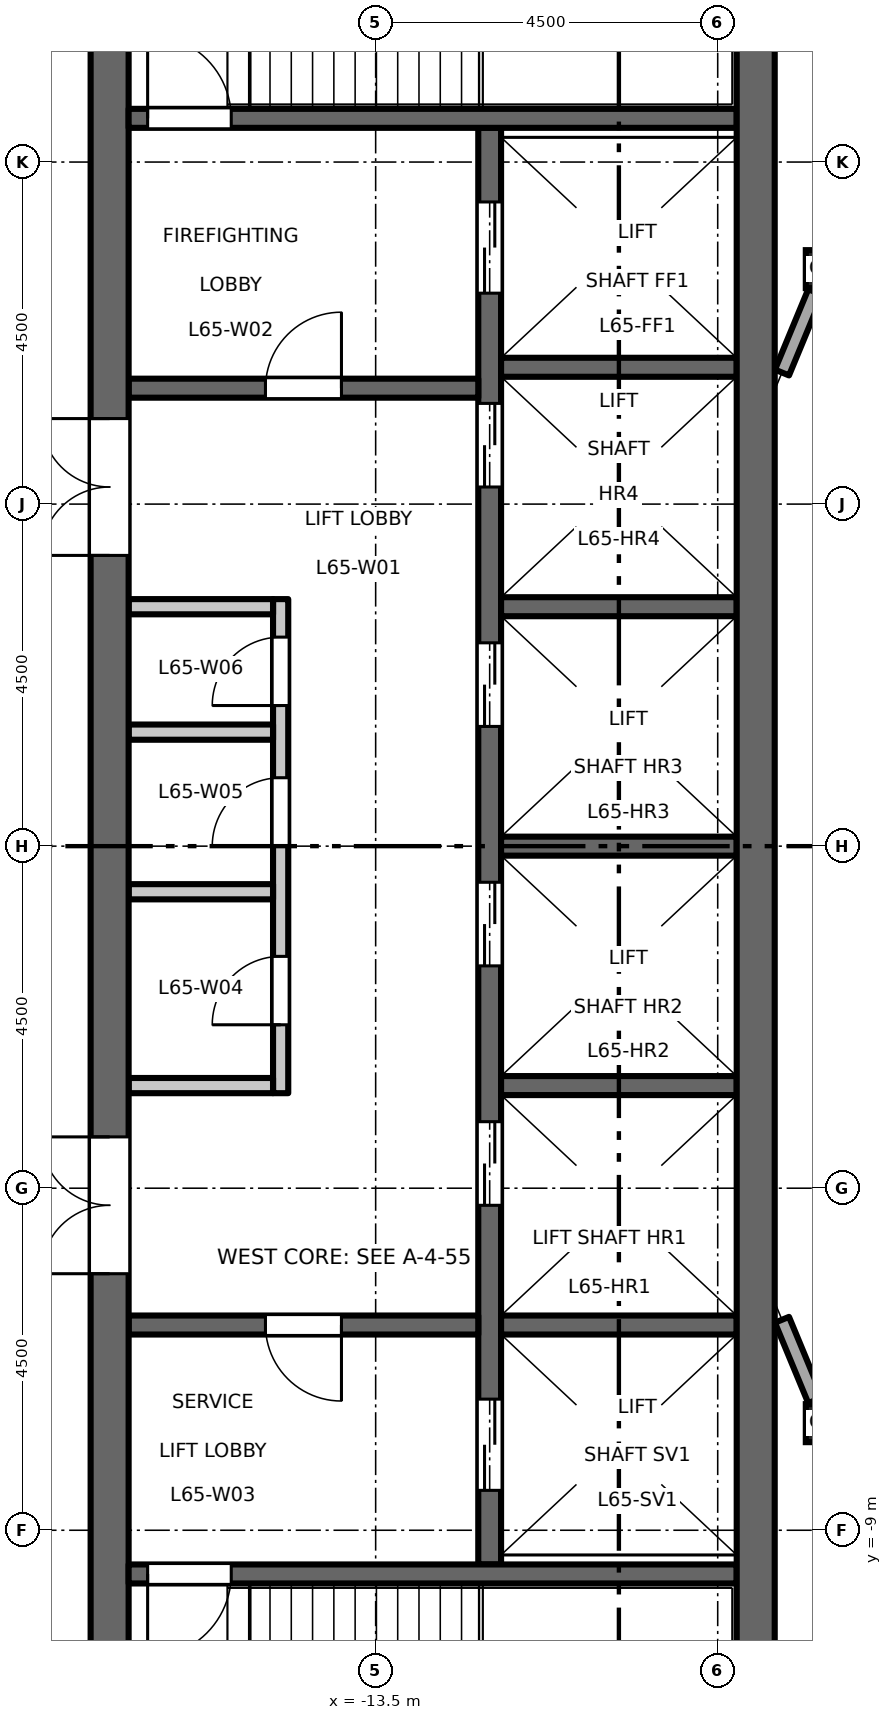
"""IFC4 building model, lengths in metres.
Left out: names, types, materials, properties, quantities, classifications, styles, units other than length and angle.
Written with IfcOpenShell. Run it as: python <this file> out.ifc"""

import sys

from ifc_helpers import new_model, si_unit, direction, frame, frame_2d, origin, origin_2d, place, context, subcontext, project, spatial, rectangle, hollow_rectangle, extrude, element, fill, save


model = new_model("IFC4")
c1 = context("Model", 3, precision=1e-05, world=origin(), true_north=direction((0.0, 1.0)))
c2 = subcontext(c1, "Body", "Model", "MODEL_VIEW")
j1 = project(units=[si_unit("LENGTHUNIT", "METRE"), si_unit("PLANEANGLEUNIT", "RADIAN")], contexts=[c1])
p1 = place(None, origin())
s1 = spatial("IfcSite", under=j1, at=p1, CompositionType="ELEMENT")
p2 = place(p1, origin())
s2 = spatial("IfcBuilding", under=s1, at=p2, CompositionType="ELEMENT")
p3 = place(p2, frame((0.0, 0.0, 303.2)))
s3 = spatial("IfcBuildingStorey", under=s2, at=p3, CompositionType="ELEMENT", Elevation=303.2)
for number, where, z_axis, x_axis in (
    (1, (-7.591, -7.591, 0.0), (0.0, 0.0, 1.0), (1.0, 0.0, 0.0)),
    (2, (-7.591, 7.591, 0.0), (0.0, 0.0, 1.0), (1.0, 0.0, 0.0)),
):
    element("IfcColumn", number, at=place(p3, frame(where, z_axis=z_axis, x_axis=x_axis)), inside=s3, PredefinedType="COLUMN", context=c2, shape_type="SweptSolid", body=[
        extrude(hollow_rectangle(XDim=0.5, YDim=0.5, WallThickness=0.025, at=origin_2d()), origin(), (0.0, 0.0, 1.0), 4.5),
    ])
p4 = place(p3, frame((-14.75, -3.25, 0.0), z_axis=(0.0, 0.0, 1.0), x_axis=(0.0, 1.0, 0.0)))
e3 = element("IfcWall", 3, at=p4, inside=s3, PredefinedType="PARTITIONING", context=c2, shape_type="SweptSolid", body=[
    extrude(rectangle(XDim=6.5, YDim=0.2, at=frame_2d((3.25, 0.0))), origin(), (0.0, 0.0, 1.0), 4.35),
])
p5 = place(p4, frame((0.9, 0.0, 0.0)))
e4 = element("IfcOpeningElement", 4, at=p5, cuts=e3, PredefinedType="OPENING", context=c2, shape_type="SweptSolid", body=[
    extrude(rectangle(XDim=0.9, YDim=2.1, at=frame_2d((0.45, 1.05))), frame((0.0, 0.11, 0.0), z_axis=(0.0, -1.0, 0.0), x_axis=(1.0, 0.0, 0.0)), (0.0, 0.0, 1.0), 0.22),
])
p6 = place(p4, frame((3.25, 0.0, 0.0)))
e5 = element("IfcOpeningElement", 5, at=p6, cuts=e3, PredefinedType="OPENING", context=c2, shape_type="SweptSolid", body=[
    extrude(rectangle(XDim=0.9, YDim=2.1, at=frame_2d((0.45, 1.05))), frame((0.0, 0.11, 0.0), z_axis=(0.0, -1.0, 0.0), x_axis=(1.0, 0.0, 0.0)), (0.0, 0.0, 1.0), 0.22),
])
p7 = place(p4, frame((5.1, 0.0, 0.0)))
e6 = element("IfcOpeningElement", 6, at=p7, cuts=e3, PredefinedType="OPENING", context=c2, shape_type="SweptSolid", body=[
    extrude(rectangle(XDim=0.9, YDim=2.1, at=frame_2d((0.45, 1.05))), frame((0.0, 0.11, 0.0), z_axis=(0.0, -1.0, 0.0), x_axis=(1.0, 0.0, 0.0)), (0.0, 0.0, 1.0), 0.22),
])
for number, where, z_axis, x_axis in (
    (7, (-14.85, 3.15, 0.0), (0.0, 0.0, 1.0), (-1.0, 0.0, 0.0)),
    (8, (-14.85, -3.15, 0.0), (0.0, 0.0, 1.0), (-1.0, 0.0, 0.0)),
    (9, (-14.85, -0.6, 0.0), (0.0, 0.0, 1.0), (-1.0, 0.0, 0.0)),
    (10, (-14.85, 1.5, 0.0), (0.0, 0.0, 1.0), (-1.0, 0.0, 0.0)),
):
    element("IfcWall", number, at=place(p3, frame(where, z_axis=z_axis, x_axis=x_axis)), inside=s3, PredefinedType="PARTITIONING", context=c2, shape_type="SweptSolid", body=[
        extrude(rectangle(XDim=1.9, YDim=0.2, at=frame_2d((0.95, 0.0))), origin(), (0.0, 0.0, 1.0), 4.35),
    ])
p8 = place(p3, frame((-12.0, -9.45, 0.0), z_axis=(0.0, 0.0, 1.0), x_axis=(0.0, 1.0, 0.0)))
e11 = element("IfcWall", 11, at=p8, inside=s3, PredefinedType="SHEAR", context=c2, shape_type="SweptSolid", body=[
    extrude(rectangle(XDim=18.9, YDim=0.3, at=frame_2d((9.45, 0.0))), origin(), (0.0, 0.0, 1.0), 4.35),
])
p9 = place(p8, frame((4.725, 0.0, 0.0)))
e12 = element("IfcOpeningElement", 12, at=p9, cuts=e11, PredefinedType="OPENING", context=c2, shape_type="SweptSolid", body=[
    extrude(rectangle(XDim=1.1, YDim=2.1, at=frame_2d((0.55, 1.05))), frame((0.0, 0.16, 0.0), z_axis=(0.0, -1.0, 0.0), x_axis=(1.0, 0.0, 0.0)), (0.0, 0.0, 1.0), 0.32),
])
p10 = place(p8, frame((7.875, 0.0, 0.0)))
e13 = element("IfcOpeningElement", 13, at=p10, cuts=e11, PredefinedType="OPENING", context=c2, shape_type="SweptSolid", body=[
    extrude(rectangle(XDim=1.1, YDim=2.1, at=frame_2d((0.55, 1.05))), frame((0.0, 0.16, 0.0), z_axis=(0.0, -1.0, 0.0), x_axis=(1.0, 0.0, 0.0)), (0.0, 0.0, 1.0), 0.32),
])
p11 = place(p8, frame((11.025, 0.0, 0.0)))
e14 = element("IfcOpeningElement", 14, at=p11, cuts=e11, PredefinedType="OPENING", context=c2, shape_type="SweptSolid", body=[
    extrude(rectangle(XDim=1.1, YDim=2.1, at=frame_2d((0.55, 1.05))), frame((0.0, 0.16, 0.0), z_axis=(0.0, -1.0, 0.0), x_axis=(1.0, 0.0, 0.0)), (0.0, 0.0, 1.0), 0.32),
])
p12 = place(p8, frame((14.175, 0.0, 0.0)))
e15 = element("IfcOpeningElement", 15, at=p12, cuts=e11, PredefinedType="OPENING", context=c2, shape_type="SweptSolid", body=[
    extrude(rectangle(XDim=1.1, YDim=2.1, at=frame_2d((0.55, 1.05))), frame((0.0, 0.16, 0.0), z_axis=(0.0, -1.0, 0.0), x_axis=(1.0, 0.0, 0.0)), (0.0, 0.0, 1.0), 0.32),
])
p13 = place(p8, frame((16.725, 0.0, 0.0)))
e16 = element("IfcOpeningElement", 16, at=p13, cuts=e11, PredefinedType="OPENING", context=c2, shape_type="SweptSolid", body=[
    extrude(rectangle(XDim=1.2, YDim=2.1, at=frame_2d((0.6, 1.05))), frame((0.0, 0.16, 0.0), z_axis=(0.0, -1.0, 0.0), x_axis=(1.0, 0.0, 0.0)), (0.0, 0.0, 1.0), 0.32),
])
p14 = place(p8, frame((0.975, 0.0, 0.0)))
e17 = element("IfcOpeningElement", 17, at=p14, cuts=e11, PredefinedType="OPENING", context=c2, shape_type="SweptSolid", body=[
    extrude(rectangle(XDim=1.2, YDim=2.1, at=frame_2d((0.6, 1.05))), frame((0.0, 0.16, 0.0), z_axis=(0.0, -1.0, 0.0), x_axis=(1.0, 0.0, 0.0)), (0.0, 0.0, 1.0), 0.32),
])
p15 = place(p3, frame((-12.15, 6.025, 0.0), z_axis=(0.0, 0.0, 1.0), x_axis=(-1.0, 0.0, 0.0)))
e18 = element("IfcWall", 18, at=p15, inside=s3, PredefinedType="SHEAR", context=c2, shape_type="SweptSolid", body=[
    extrude(rectangle(XDim=4.6, YDim=0.25, at=frame_2d((2.3, 0.0))), origin(), (0.0, 0.0, 1.0), 4.35),
])
p16 = place(p15, frame((1.8, 0.0, 0.0)))
e19 = element("IfcOpeningElement", 19, at=p16, cuts=e18, PredefinedType="OPENING", context=c2, shape_type="SweptSolid", body=[
    extrude(rectangle(XDim=1.0, YDim=2.1, at=frame_2d((0.5, 1.05))), frame((0.0, 0.135, 0.0), z_axis=(0.0, -1.0, 0.0), x_axis=(1.0, 0.0, 0.0)), (0.0, 0.0, 1.0), 0.27),
])
p17 = place(p3, frame((-12.15, -6.3, 0.0), z_axis=(0.0, 0.0, 1.0), x_axis=(-1.0, 0.0, 0.0)))
e20 = element("IfcWall", 20, at=p17, inside=s3, PredefinedType="SHEAR", context=c2, shape_type="SweptSolid", body=[
    extrude(rectangle(XDim=4.6, YDim=0.25, at=frame_2d((2.3, 0.0))), origin(), (0.0, 0.0, 1.0), 4.35),
])
p18 = place(p17, frame((1.8, 0.0, 0.0)))
e21 = element("IfcOpeningElement", 21, at=p18, cuts=e20, PredefinedType="OPENING", context=c2, shape_type="SweptSolid", body=[
    extrude(rectangle(XDim=1.0, YDim=2.1, at=frame_2d((0.5, 1.05))), frame((0.0, 0.135, 0.0), z_axis=(0.0, -1.0, 0.0), x_axis=(1.0, 0.0, 0.0)), (0.0, 0.0, 1.0), 0.27),
])
p19 = place(p3, frame((-17.0, -13.0, 0.0), z_axis=(0.0, 0.0, 1.0), x_axis=(0.0, 1.0, 0.0)))
e22 = element("IfcWall", 22, at=p19, inside=s3, PredefinedType="SHEAR", context=c2, shape_type="SweptSolid", body=[
    extrude(rectangle(XDim=26.0, YDim=0.5, at=frame_2d((13.0, 0.0))), origin(), (0.0, 0.0, 1.0), 4.35),
])
p20 = place(p19, frame((16.825, 0.0, 0.0)))
e23 = element("IfcOpeningElement", 23, at=p20, cuts=e22, PredefinedType="OPENING", context=c2, shape_type="SweptSolid", body=[
    extrude(rectangle(XDim=1.8, YDim=2.1, at=frame_2d((0.9, 1.05))), frame((0.0, 0.26, 0.0), z_axis=(0.0, -1.0, 0.0), x_axis=(1.0, 0.0, 0.0)), (0.0, 0.0, 1.0), 0.52),
])
p21 = place(p19, frame((7.375, 0.0, 0.0)))
e24 = element("IfcOpeningElement", 24, at=p21, cuts=e22, PredefinedType="OPENING", context=c2, shape_type="SweptSolid", body=[
    extrude(rectangle(XDim=1.8, YDim=2.1, at=frame_2d((0.9, 1.05))), frame((0.0, 0.26, 0.0), z_axis=(0.0, -1.0, 0.0), x_axis=(1.0, 0.0, 0.0)), (0.0, 0.0, 1.0), 0.52),
])
for number, where, z_axis, x_axis in (
    (25, (-8.75, 0.0, 0.0), (0.0, 0.0, 1.0), (-1.0, 0.0, 0.0)),
    (26, (-8.75, 3.15, 0.0), (0.0, 0.0, 1.0), (-1.0, 0.0, 0.0)),
    (27, (-8.75, 6.3, 0.0), (0.0, 0.0, 1.0), (-1.0, 0.0, 0.0)),
    (28, (-8.75, -3.15, 0.0), (0.0, 0.0, 1.0), (-1.0, 0.0, 0.0)),
    (29, (-8.75, -6.3, 0.0), (0.0, 0.0, 1.0), (-1.0, 0.0, 0.0)),
):
    element("IfcWall", number, at=place(p3, frame(where, z_axis=z_axis, x_axis=x_axis)), inside=s3, PredefinedType="SHEAR", context=c2, shape_type="SweptSolid", body=[
        extrude(rectangle(XDim=3.1, YDim=0.25, at=frame_2d((1.55, 0.0))), origin(), (0.0, 0.0, 1.0), 4.35),
    ])
p22 = place(p3, frame((-8.75, 9.575, 0.0), z_axis=(0.0, 0.0, 1.0), x_axis=(-1.0, 0.0, 0.0)))
e30 = element("IfcWall", 30, at=p22, inside=s3, PredefinedType="SHEAR", context=c2, shape_type="SweptSolid", body=[
    extrude(rectangle(XDim=8.0, YDim=0.25, at=frame_2d((4.0, 0.0))), origin(), (0.0, 0.0, 1.0), 4.35),
])
p23 = place(p22, frame((6.65, 0.0, 0.0)))
e31 = element("IfcOpeningElement", 31, at=p23, cuts=e30, PredefinedType="OPENING", context=c2, shape_type="SweptSolid", body=[
    extrude(rectangle(XDim=1.1, YDim=2.1, at=frame_2d((0.55, 1.05))), frame((0.0, 0.135, 0.0), z_axis=(0.0, -1.0, 0.0), x_axis=(1.0, 0.0, 0.0)), (0.0, 0.0, 1.0), 0.27),
])
p24 = place(p3, frame((-8.75, -9.575, 0.0), z_axis=(0.0, 0.0, 1.0), x_axis=(-1.0, 0.0, 0.0)))
e32 = element("IfcWall", 32, at=p24, inside=s3, PredefinedType="SHEAR", context=c2, shape_type="SweptSolid", body=[
    extrude(rectangle(XDim=8.0, YDim=0.25, at=frame_2d((4.0, 0.0))), origin(), (0.0, 0.0, 1.0), 4.35),
])
p25 = place(p24, frame((6.65, 0.0, 0.0)))
e33 = element("IfcOpeningElement", 33, at=p25, cuts=e32, PredefinedType="OPENING", context=c2, shape_type="SweptSolid", body=[
    extrude(rectangle(XDim=1.1, YDim=2.1, at=frame_2d((0.55, 1.05))), frame((0.0, 0.135, 0.0), z_axis=(0.0, -1.0, 0.0), x_axis=(1.0, 0.0, 0.0)), (0.0, 0.0, 1.0), 0.27),
])
p26 = place(p3, frame((-8.5, -13.0, 0.0), z_axis=(0.0, 0.0, 1.0), x_axis=(0.0, 1.0, 0.0)))
e34 = element("IfcWall", 34, at=p26, inside=s3, PredefinedType="SHEAR", context=c2, shape_type="SweptSolid", body=[
    extrude(rectangle(XDim=26.0, YDim=0.5, at=frame_2d((13.0, 0.0))), origin(), (0.0, 0.0, 1.0), 4.35),
])
for number, where, z_axis, x_axis in (
    (35, (-7.716, 7.289, 0.0), (0.0, 0.0, 1.0), (-0.383, -0.924, 0.0)),
    (36, (-8.154, -6.231, 0.0), (0.0, 0.0, 1.0), (0.383, -0.924, 0.0)),
):
    element("IfcWall", number, at=place(p3, frame(where, z_axis=z_axis, x_axis=x_axis)), inside=s3, PredefinedType="STANDARD", context=c2, shape_type="SweptSolid", body=[
        extrude(rectangle(XDim=1.146, YDim=0.2, at=frame_2d((0.573, 0.0))), origin(), (0.0, 0.0, 1.0), 4.01),
    ])
p27 = place(p16, origin())
e37 = element("IfcDoor", 37, at=p27, inside=s3, OperationType="SINGLE_SWING_LEFT", PredefinedType="DOOR", context=c2, shape_type="SweptSolid", body=[
    extrude(rectangle(XDim=1.0, YDim=2.1, at=frame_2d((0.5, 1.05))), frame((0.0, 0.025, 0.0), z_axis=(0.0, -1.0, 0.0), x_axis=(1.0, 0.0, 0.0)), (0.0, 0.0, 1.0), 0.05),
])
fill(e19, e37)
p28 = place(p18, origin())
e38 = element("IfcDoor", 38, at=p28, inside=s3, OperationType="SINGLE_SWING_RIGHT", PredefinedType="DOOR", context=c2, shape_type="SweptSolid", body=[
    extrude(rectangle(XDim=1.0, YDim=2.1, at=frame_2d((0.5, 1.05))), frame((0.0, 0.025, 0.0), z_axis=(0.0, -1.0, 0.0), x_axis=(1.0, 0.0, 0.0)), (0.0, 0.0, 1.0), 0.05),
])
fill(e21, e38)
p29 = place(p23, origin())
e39 = element("IfcDoor", 39, at=p29, inside=s3, OperationType="SINGLE_SWING_RIGHT", PredefinedType="DOOR", context=c2, shape_type="SweptSolid", body=[
    extrude(rectangle(XDim=1.1, YDim=2.1, at=frame_2d((0.55, 1.05))), frame((0.0, 0.025, 0.0), z_axis=(0.0, -1.0, 0.0), x_axis=(1.0, 0.0, 0.0)), (0.0, 0.0, 1.0), 0.05),
])
fill(e31, e39)
p30 = place(p25, origin())
e40 = element("IfcDoor", 40, at=p30, inside=s3, OperationType="SINGLE_SWING_LEFT", PredefinedType="DOOR", context=c2, shape_type="SweptSolid", body=[
    extrude(rectangle(XDim=1.1, YDim=2.1, at=frame_2d((0.55, 1.05))), frame((0.0, 0.025, 0.0), z_axis=(0.0, -1.0, 0.0), x_axis=(1.0, 0.0, 0.0)), (0.0, 0.0, 1.0), 0.05),
])
fill(e33, e40)
p31 = place(p20, origin())
e41 = element("IfcDoor", 41, at=p31, inside=s3, OperationType="DOUBLE_DOOR_DOUBLE_SWING", PredefinedType="DOOR", context=c2, shape_type="SweptSolid", body=[
    extrude(rectangle(XDim=1.8, YDim=2.1, at=frame_2d((0.9, 1.05))), frame((0.0, 0.025, 0.0), z_axis=(0.0, -1.0, 0.0), x_axis=(1.0, 0.0, 0.0)), (0.0, 0.0, 1.0), 0.05),
])
fill(e23, e41)
p32 = place(p21, origin())
e42 = element("IfcDoor", 42, at=p32, inside=s3, OperationType="DOUBLE_DOOR_DOUBLE_SWING", PredefinedType="DOOR", context=c2, shape_type="SweptSolid", body=[
    extrude(rectangle(XDim=1.8, YDim=2.1, at=frame_2d((0.9, 1.05))), frame((0.0, 0.025, 0.0), z_axis=(0.0, -1.0, 0.0), x_axis=(1.0, 0.0, 0.0)), (0.0, 0.0, 1.0), 0.05),
])
fill(e24, e42)
p33 = place(p9, origin())
e43 = element("IfcDoor", 43, at=p33, inside=s3, OperationType="DOUBLE_DOOR_SLIDING", PredefinedType="DOOR", context=c2, shape_type="SweptSolid", body=[
    extrude(rectangle(XDim=1.1, YDim=2.1, at=frame_2d((0.55, 1.05))), frame((0.0, 0.025, 0.0), z_axis=(0.0, -1.0, 0.0), x_axis=(1.0, 0.0, 0.0)), (0.0, 0.0, 1.0), 0.05),
])
fill(e12, e43)
p34 = place(p10, origin())
e44 = element("IfcDoor", 44, at=p34, inside=s3, OperationType="DOUBLE_DOOR_SLIDING", PredefinedType="DOOR", context=c2, shape_type="SweptSolid", body=[
    extrude(rectangle(XDim=1.1, YDim=2.1, at=frame_2d((0.55, 1.05))), frame((0.0, 0.025, 0.0), z_axis=(0.0, -1.0, 0.0), x_axis=(1.0, 0.0, 0.0)), (0.0, 0.0, 1.0), 0.05),
])
fill(e13, e44)
p35 = place(p11, origin())
e45 = element("IfcDoor", 45, at=p35, inside=s3, OperationType="DOUBLE_DOOR_SLIDING", PredefinedType="DOOR", context=c2, shape_type="SweptSolid", body=[
    extrude(rectangle(XDim=1.1, YDim=2.1, at=frame_2d((0.55, 1.05))), frame((0.0, 0.025, 0.0), z_axis=(0.0, -1.0, 0.0), x_axis=(1.0, 0.0, 0.0)), (0.0, 0.0, 1.0), 0.05),
])
fill(e14, e45)
p36 = place(p12, origin())
e46 = element("IfcDoor", 46, at=p36, inside=s3, OperationType="DOUBLE_DOOR_SLIDING", PredefinedType="DOOR", context=c2, shape_type="SweptSolid", body=[
    extrude(rectangle(XDim=1.1, YDim=2.1, at=frame_2d((0.55, 1.05))), frame((0.0, 0.025, 0.0), z_axis=(0.0, -1.0, 0.0), x_axis=(1.0, 0.0, 0.0)), (0.0, 0.0, 1.0), 0.05),
])
fill(e15, e46)
p37 = place(p13, origin())
e47 = element("IfcDoor", 47, at=p37, inside=s3, OperationType="DOUBLE_DOOR_SLIDING", PredefinedType="DOOR", context=c2, shape_type="SweptSolid", body=[
    extrude(rectangle(XDim=1.2, YDim=2.1, at=frame_2d((0.6, 1.05))), frame((0.0, 0.025, 0.0), z_axis=(0.0, -1.0, 0.0), x_axis=(1.0, 0.0, 0.0)), (0.0, 0.0, 1.0), 0.05),
])
fill(e16, e47)
p38 = place(p14, origin())
e48 = element("IfcDoor", 48, at=p38, inside=s3, OperationType="DOUBLE_DOOR_SLIDING", PredefinedType="DOOR", context=c2, shape_type="SweptSolid", body=[
    extrude(rectangle(XDim=1.2, YDim=2.1, at=frame_2d((0.6, 1.05))), frame((0.0, 0.025, 0.0), z_axis=(0.0, -1.0, 0.0), x_axis=(1.0, 0.0, 0.0)), (0.0, 0.0, 1.0), 0.05),
])
fill(e17, e48)
p39 = place(p5, origin())
e49 = element("IfcDoor", 49, at=p39, inside=s3, OperationType="SINGLE_SWING_RIGHT", PredefinedType="DOOR", context=c2, shape_type="SweptSolid", body=[
    extrude(rectangle(XDim=0.9, YDim=2.1, at=frame_2d((0.45, 1.05))), frame((0.0, 0.025, 0.0), z_axis=(0.0, -1.0, 0.0), x_axis=(1.0, 0.0, 0.0)), (0.0, 0.0, 1.0), 0.05),
])
fill(e4, e49)
p40 = place(p6, origin())
e50 = element("IfcDoor", 50, at=p40, inside=s3, OperationType="SINGLE_SWING_RIGHT", PredefinedType="DOOR", context=c2, shape_type="SweptSolid", body=[
    extrude(rectangle(XDim=0.9, YDim=2.1, at=frame_2d((0.45, 1.05))), frame((0.0, 0.025, 0.0), z_axis=(0.0, -1.0, 0.0), x_axis=(1.0, 0.0, 0.0)), (0.0, 0.0, 1.0), 0.05),
])
fill(e5, e50)
p41 = place(p7, origin())
e51 = element("IfcDoor", 51, at=p41, inside=s3, OperationType="SINGLE_SWING_RIGHT", PredefinedType="DOOR", context=c2, shape_type="SweptSolid", body=[
    extrude(rectangle(XDim=0.9, YDim=2.1, at=frame_2d((0.45, 1.05))), frame((0.0, 0.025, 0.0), z_axis=(0.0, -1.0, 0.0), x_axis=(1.0, 0.0, 0.0)), (0.0, 0.0, 1.0), 0.05),
])
fill(e6, e51)
save(model, sys.argv[1])
